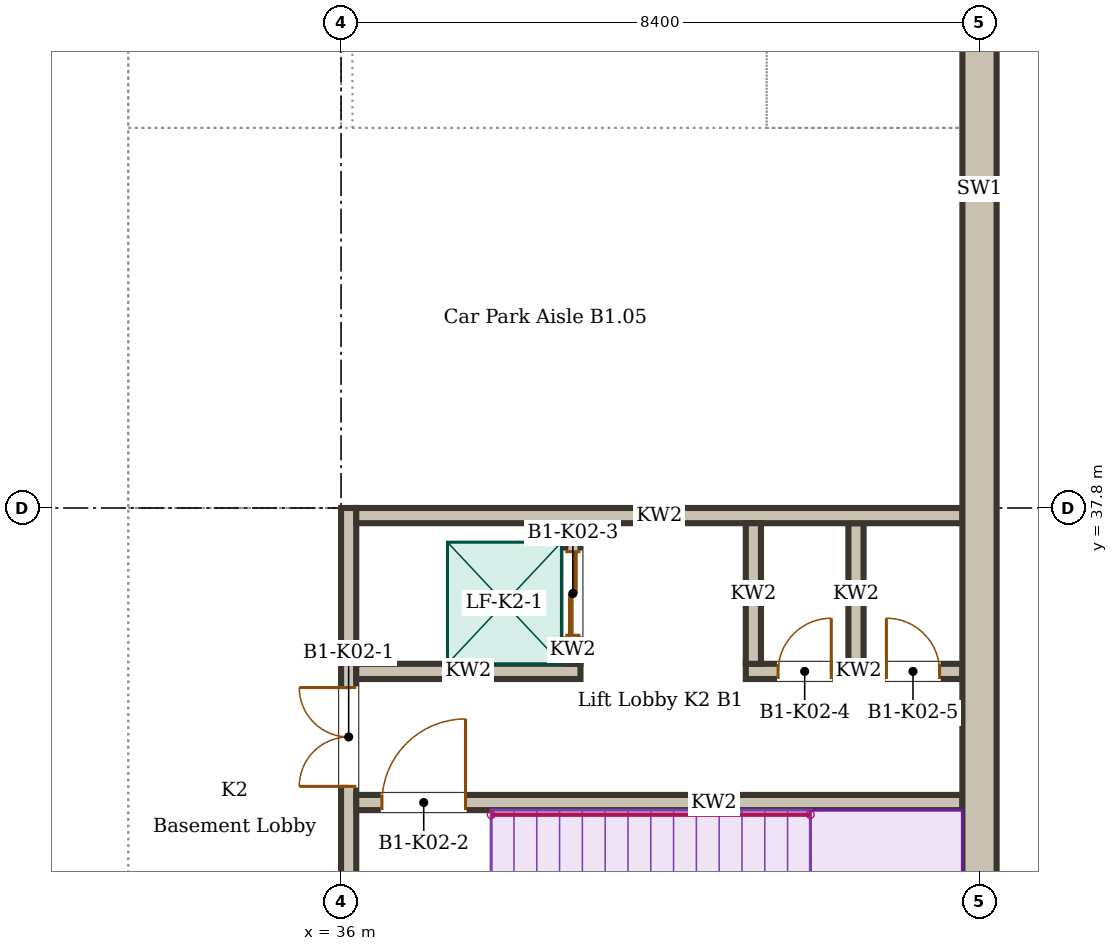
"""IFC4 building model, lengths in metres.
Left out: names, types, materials, properties, quantities, classifications, styles, units other than length and angle.
Written with IfcOpenShell. Run it as: python <this file> out.ifc"""

import sys

from ifc_helpers import new_model, si_unit, direction, frame, frame_2d, origin, place, context, subcontext, project, spatial, rectangle, extrude, element, fill, save


model = new_model("IFC4")
c1 = context("Model", 3, precision=1e-05, world=origin(), true_north=direction((0.0, 1.0)))
c2 = subcontext(c1, "Body", "Model", "MODEL_VIEW")
j1 = project(units=[si_unit("LENGTHUNIT", "METRE"), si_unit("PLANEANGLEUNIT", "RADIAN")], contexts=[c1])
p1 = place(None, origin())
s1 = spatial("IfcSite", under=j1, at=p1, CompositionType="ELEMENT")
p2 = place(p1, origin())
s2 = spatial("IfcBuilding", under=s1, at=p2, CompositionType="ELEMENT")
p3 = place(p2, frame((0.0, 0.0, -4.5)))
s3 = spatial("IfcBuildingStorey", under=s2, at=p3, CompositionType="ELEMENT", Elevation=-4.5)
p4 = place(p3, frame((44.4, 29.4, 0.0), z_axis=(0.0, 0.0, 1.0), x_axis=(0.0, 1.0, 0.0)))
e1 = element("IfcWall", 1, at=p4, inside=s3, PredefinedType="SOLIDWALL", context=c2, shape_type="SweptSolid", body=[
    extrude(rectangle(XDim=25.2, YDim=0.45, at=frame_2d((12.6, 0.0))), origin(), (0.0, 0.0, 1.0), 4.35),
])
p5 = place(p3, frame((36.1, 29.625, 0.0), z_axis=(0.0, 0.0, 1.0), x_axis=(0.0, 1.0, 0.0)))
e2 = element("IfcWall", 2, at=p5, inside=s3, PredefinedType="SOLIDWALL", context=c2, shape_type="SweptSolid", body=[
    extrude(rectangle(XDim=8.175, YDim=0.2, at=frame_2d((4.087, 0.0))), origin(), (0.0, 0.0, 1.0), 4.5),
])
p6 = place(p5, frame((4.512, 0.0, 0.0)))
e3 = element("IfcOpeningElement", 3, at=p6, cuts=e2, PredefinedType="OPENING", context=c2, shape_type="SweptSolid", body=[
    extrude(rectangle(XDim=1.3, YDim=2.1, at=frame_2d((0.65, 1.05))), frame((0.0, 0.11, 0.0), z_axis=(0.0, -1.0, 0.0), x_axis=(1.0, 0.0, 0.0)), (0.0, 0.0, 1.0), 0.22),
])
p7 = place(p3, frame((36.2, 37.7, 0.0), z_axis=(0.0, 0.0, 1.0), x_axis=(1.0, 0.0, 0.0)))
e4 = element("IfcWall", 4, at=p7, inside=s3, PredefinedType="SOLIDWALL", context=c2, shape_type="SweptSolid", body=[
    extrude(rectangle(XDim=7.975, YDim=0.2, at=frame_2d((3.988, 0.0))), origin(), (0.0, 0.0, 1.0), 4.5),
])
p8 = place(p3, frame((36.2, 33.925, 0.0), z_axis=(0.0, 0.0, 1.0), x_axis=(1.0, 0.0, 0.0)))
e5 = element("IfcWall", 5, at=p8, inside=s3, PredefinedType="SOLIDWALL", context=c2, shape_type="SweptSolid", body=[
    extrude(rectangle(XDim=7.975, YDim=0.2, at=frame_2d((3.988, 0.0))), origin(), (0.0, 0.0, 1.0), 4.5),
])
p9 = place(p8, frame((0.337, 0.0, 0.0)))
e6 = element("IfcOpeningElement", 6, at=p9, cuts=e5, PredefinedType="OPENING", context=c2, shape_type="SweptSolid", body=[
    extrude(rectangle(XDim=1.1, YDim=2.1, at=frame_2d((0.55, 1.05))), frame((0.0, 0.11, 0.0), z_axis=(0.0, -1.0, 0.0), x_axis=(1.0, 0.0, 0.0)), (0.0, 0.0, 1.0), 0.22),
])
p10 = place(p3, frame((36.2, 35.65, 0.0), z_axis=(0.0, 0.0, 1.0), x_axis=(1.0, 0.0, 0.0)))
e7 = element("IfcWall", 7, at=p10, inside=s3, PredefinedType="SOLIDWALL", context=c2, shape_type="SweptSolid", body=[
    extrude(rectangle(XDim=2.95, YDim=0.2, at=frame_2d((1.475, 0.0))), origin(), (0.0, 0.0, 1.0), 4.5),
])
p11 = place(p3, frame((41.325, 35.65, 0.0), z_axis=(0.0, 0.0, 1.0), x_axis=(1.0, 0.0, 0.0)))
e8 = element("IfcWall", 8, at=p11, inside=s3, PredefinedType="SOLIDWALL", context=c2, shape_type="SweptSolid", body=[
    extrude(rectangle(XDim=2.85, YDim=0.2, at=frame_2d((1.425, 0.0))), origin(), (0.0, 0.0, 1.0), 4.35),
])
p12 = place(p11, frame((0.425, 0.0, 0.0)))
e9 = element("IfcOpeningElement", 9, at=p12, cuts=e8, PredefinedType="OPENING", context=c2, shape_type="SweptSolid", body=[
    extrude(rectangle(XDim=0.7, YDim=2.1, at=frame_2d((0.35, 1.05))), frame((0.0, 0.11, 0.0), z_axis=(0.0, -1.0, 0.0), x_axis=(1.0, 0.0, 0.0)), (0.0, 0.0, 1.0), 0.22),
])
p13 = place(p11, frame((1.85, 0.0, 0.0)))
e10 = element("IfcOpeningElement", 10, at=p13, cuts=e8, PredefinedType="OPENING", context=c2, shape_type="SweptSolid", body=[
    extrude(rectangle(XDim=0.7, YDim=2.1, at=frame_2d((0.35, 1.05))), frame((0.0, 0.11, 0.0), z_axis=(0.0, -1.0, 0.0), x_axis=(1.0, 0.0, 0.0)), (0.0, 0.0, 1.0), 0.22),
])
p14 = place(p3, frame((39.05, 35.75, 0.0), z_axis=(0.0, 0.0, 1.0), x_axis=(0.0, 1.0, 0.0)))
e11 = element("IfcWall", 11, at=p14, inside=s3, PredefinedType="SOLIDWALL", context=c2, shape_type="SweptSolid", body=[
    extrude(rectangle(XDim=1.85, YDim=0.2, at=frame_2d((0.925, 0.0))), origin(), (0.0, 0.0, 1.0), 4.5),
])
p15 = place(p14, frame((0.375, 0.0, 0.0)))
e12 = element("IfcOpeningElement", 12, at=p15, cuts=e11, PredefinedType="OPENING", context=c2, shape_type="SweptSolid", body=[
    extrude(rectangle(XDim=1.1, YDim=2.1, at=frame_2d((0.55, 1.05))), frame((0.0, 0.11, 0.0), z_axis=(0.0, -1.0, 0.0), x_axis=(1.0, 0.0, 0.0)), (0.0, 0.0, 1.0), 0.22),
])
for number, where, z_axis, x_axis in (
    (13, (41.425, 35.75, 0.0), (0.0, 0.0, 1.0), (0.0, 1.0, 0.0)),
    (14, (42.775, 35.75, 0.0), (0.0, 0.0, 1.0), (0.0, 1.0, 0.0)),
):
    element("IfcWall", number, at=place(p3, frame(where, z_axis=z_axis, x_axis=x_axis)), inside=s3, PredefinedType="SOLIDWALL", context=c2, shape_type="SweptSolid", body=[
        extrude(rectangle(XDim=1.85, YDim=0.2, at=frame_2d((0.925, 0.0))), origin(), (0.0, 0.0, 1.0), 4.35),
    ])
p16 = place(p6, origin())
e15 = element("IfcDoor", 15, at=p16, inside=s3, OperationType="DOUBLE_DOOR_DOUBLE_SWING", PredefinedType="DOOR", context=c2, shape_type="SweptSolid", body=[
    extrude(rectangle(XDim=1.3, YDim=2.1, at=frame_2d((0.65, 1.05))), frame((0.0, 0.025, 0.0), z_axis=(0.0, -1.0, 0.0), x_axis=(1.0, 0.0, 0.0)), (0.0, 0.0, 1.0), 0.05),
])
fill(e3, e15)
p17 = place(p9, origin())
e16 = element("IfcDoor", 16, at=p17, inside=s3, OperationType="SINGLE_SWING_RIGHT", PredefinedType="DOOR", context=c2, shape_type="SweptSolid", body=[
    extrude(rectangle(XDim=1.1, YDim=2.1, at=frame_2d((0.55, 1.05))), frame((0.0, 0.025, 0.0), z_axis=(0.0, -1.0, 0.0), x_axis=(1.0, 0.0, 0.0)), (0.0, 0.0, 1.0), 0.05),
])
fill(e6, e16)
p18 = place(p15, origin())
e17 = element("IfcDoor", 17, at=p18, inside=s3, OperationType="DOUBLE_DOOR_SLIDING", PredefinedType="DOOR", context=c2, shape_type="SweptSolid", body=[
    extrude(rectangle(XDim=1.1, YDim=2.1, at=frame_2d((0.55, 1.05))), frame((0.0, 0.025, 0.0), z_axis=(0.0, -1.0, 0.0), x_axis=(1.0, 0.0, 0.0)), (0.0, 0.0, 1.0), 0.05),
])
fill(e12, e17)
p19 = place(p12, origin())
e18 = element("IfcDoor", 18, at=p19, inside=s3, OperationType="SINGLE_SWING_RIGHT", PredefinedType="DOOR", context=c2, shape_type="SweptSolid", body=[
    extrude(rectangle(XDim=0.7, YDim=2.1, at=frame_2d((0.35, 1.05))), frame((0.0, 0.025, 0.0), z_axis=(0.0, -1.0, 0.0), x_axis=(1.0, 0.0, 0.0)), (0.0, 0.0, 1.0), 0.05),
])
fill(e9, e18)
p20 = place(p13, origin())
e19 = element("IfcDoor", 19, at=p20, inside=s3, OperationType="SINGLE_SWING_LEFT", PredefinedType="DOOR", context=c2, shape_type="SweptSolid", body=[
    extrude(rectangle(XDim=0.7, YDim=2.1, at=frame_2d((0.35, 1.05))), frame((0.0, 0.025, 0.0), z_axis=(0.0, -1.0, 0.0), x_axis=(1.0, 0.0, 0.0)), (0.0, 0.0, 1.0), 0.05),
])
fill(e10, e19)
save(model, sys.argv[1])
